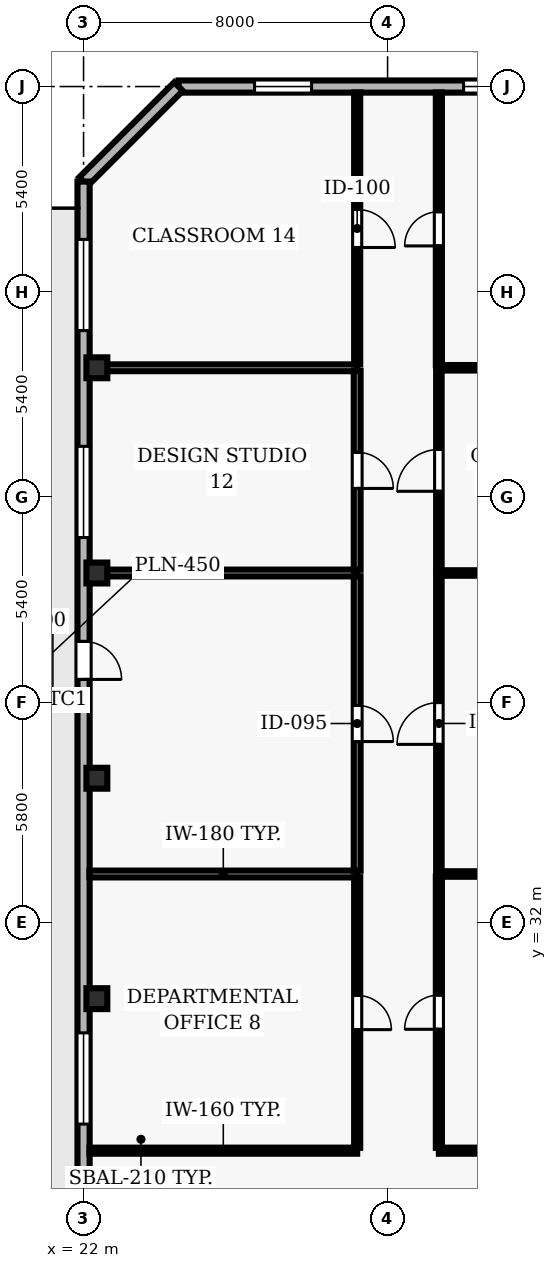
"""IFC4 building model, lengths in metres.
Left out: names, types, materials, properties, quantities, classifications, styles, units other than length and angle.
Written with IfcOpenShell. Run it as: python <this file> out.ifc"""

import sys

from ifc_helpers import new_model, si_unit, direction, frame, frame_2d, origin, origin_2d, place, context, subcontext, project, spatial, rectangle, hollow_rectangle, extrude, element, fill, save


model = new_model("IFC4")
c1 = context("Model", 3, precision=1e-05, world=origin(), true_north=direction((0.0, 1.0)))
c2 = subcontext(c1, "Body", "Model", "MODEL_VIEW")
j1 = project(units=[si_unit("LENGTHUNIT", "METRE"), si_unit("PLANEANGLEUNIT", "RADIAN")], contexts=[c1])
p1 = place(None, origin())
s1 = spatial("IfcSite", under=j1, at=p1, CompositionType="ELEMENT")
p2 = place(p1, origin())
s2 = spatial("IfcBuilding", under=s1, at=p2, CompositionType="ELEMENT")
p3 = place(p2, frame((0.0, 0.0, 81.7)))
s3 = spatial("IfcBuildingStorey", under=s2, at=p3, CompositionType="ELEMENT", Elevation=81.7)
for number, where, z_axis, x_axis in (
    (1, (22.35, 30.0, 0.0), (0.0, 0.0, 1.0), (1.0, 0.0, 0.0)),
    (2, (22.35, 35.8, 0.0), (0.0, 0.0, 1.0), (1.0, 0.0, 0.0)),
    (3, (22.35, 41.2, 0.0), (0.0, 0.0, 1.0), (1.0, 0.0, 0.0)),
    (4, (22.35, 46.6, 0.0), (0.0, 0.0, 1.0), (1.0, 0.0, 0.0)),
):
    element("IfcColumn", number, at=place(p3, frame(where, z_axis=z_axis, x_axis=x_axis)), inside=s3, PredefinedType="COLUMN", context=c2, shape_type="SweptSolid", body=[
        extrude(hollow_rectangle(XDim=0.55, YDim=0.55, WallThickness=0.025, at=origin_2d()), origin(), (0.0, 0.0, 1.0), 3.9),
    ])
p4 = place(p3, frame((35.5, 54.0, 0.0), z_axis=(0.0, 0.0, 1.0), x_axis=(-1.0, 0.0, 0.0)))
e5 = element("IfcWall", 5, at=p4, inside=s3, PredefinedType="SOLIDWALL", context=c2, shape_type="SweptSolid", body=[
    extrude(rectangle(XDim=11.0, YDim=0.32, at=frame_2d((5.5, 0.0))), origin(), (0.0, 0.0, 1.0), 3.69),
])
p5 = place(p4, frame((2.0, 0.0, 0.9)))
e6 = element("IfcOpeningElement", 6, at=p5, cuts=e5, PredefinedType="OPENING", context=c2, shape_type="SweptSolid", body=[
    extrude(rectangle(XDim=1.5, YDim=1.8, at=frame_2d((0.75, 0.9))), frame((0.0, 0.17, 0.0), z_axis=(0.0, -1.0, 0.0), x_axis=(1.0, 0.0, 0.0)), (0.0, 0.0, 1.0), 0.34),
])
p6 = place(p4, frame((7.5, 0.0, 0.9)))
e7 = element("IfcOpeningElement", 7, at=p6, cuts=e5, PredefinedType="OPENING", context=c2, shape_type="SweptSolid", body=[
    extrude(rectangle(XDim=1.5, YDim=1.8, at=frame_2d((0.75, 0.9))), frame((0.0, 0.17, 0.0), z_axis=(0.0, -1.0, 0.0), x_axis=(1.0, 0.0, 0.0)), (0.0, 0.0, 1.0), 0.34),
])
p7 = place(p3, frame((24.5, 54.0, 0.0), z_axis=(0.0, 0.0, 1.0), x_axis=(-0.707106781187, -0.707106781187, 0.0)))
e8 = element("IfcWall", 8, at=p7, inside=s3, PredefinedType="SOLIDWALL", context=c2, shape_type="SweptSolid", body=[
    extrude(rectangle(XDim=3.536, YDim=0.32, at=frame_2d((1.768, 0.0))), origin(), (0.0, 0.0, 1.0), 3.69),
])
p8 = place(p3, frame((22.0, 51.5, 0.0), z_axis=(0.0, 0.0, 1.0), x_axis=(0.0, -1.0, 0.0)))
e9 = element("IfcWall", 9, at=p8, inside=s3, PredefinedType="SOLIDWALL", context=c2, shape_type="SweptSolid", body=[
    extrude(rectangle(XDim=49.0, YDim=0.32, at=frame_2d((24.5, 0.0))), origin(), (0.0, 0.0, 1.0), 3.69),
])
p9 = place(p8, frame((12.1, 0.0, 0.0)))
e10 = element("IfcOpeningElement", 10, at=p9, cuts=e9, PredefinedType="OPENING", context=c2, shape_type="SweptSolid", body=[
    extrude(rectangle(XDim=1.0, YDim=2.2, at=frame_2d((0.5, 1.1))), frame((0.0, 0.17, 0.0), z_axis=(0.0, -1.0, 0.0), x_axis=(1.0, 0.0, 0.0)), (0.0, 0.0, 1.0), 0.34),
])
p10 = place(p8, frame((1.522, 0.0, 0.9)))
e11 = element("IfcOpeningElement", 11, at=p10, cuts=e9, PredefinedType="OPENING", context=c2, shape_type="SweptSolid", body=[
    extrude(rectangle(XDim=2.4, YDim=1.8, at=frame_2d((1.2, 0.9))), frame((0.0, 0.17, 0.0), z_axis=(0.0, -1.0, 0.0), x_axis=(1.0, 0.0, 0.0)), (0.0, 0.0, 1.0), 0.34),
])
p11 = place(p8, frame((6.967, 0.0, 0.9)))
e12 = element("IfcOpeningElement", 12, at=p11, cuts=e9, PredefinedType="OPENING", context=c2, shape_type="SweptSolid", body=[
    extrude(rectangle(XDim=2.4, YDim=1.8, at=frame_2d((1.2, 0.9))), frame((0.0, 0.17, 0.0), z_axis=(0.0, -1.0, 0.0), x_axis=(1.0, 0.0, 0.0)), (0.0, 0.0, 1.0), 0.34),
])
p12 = place(p8, frame((22.4, 0.0, 0.9)))
e13 = element("IfcOpeningElement", 13, at=p12, cuts=e9, PredefinedType="OPENING", context=c2, shape_type="SweptSolid", body=[
    extrude(rectangle(XDim=2.4, YDim=1.8, at=frame_2d((1.2, 0.9))), frame((0.0, 0.17, 0.0), z_axis=(0.0, -1.0, 0.0), x_axis=(1.0, 0.0, 0.0)), (0.0, 0.0, 1.0), 0.34),
])
p13 = place(p8, frame((29.194, 0.0, 0.9)))
e14 = element("IfcOpeningElement", 14, at=p13, cuts=e9, PredefinedType="OPENING", context=c2, shape_type="SweptSolid", body=[
    extrude(rectangle(XDim=2.4, YDim=1.8, at=frame_2d((1.2, 0.9))), frame((0.0, 0.17, 0.0), z_axis=(0.0, -1.0, 0.0), x_axis=(1.0, 0.0, 0.0)), (0.0, 0.0, 1.0), 0.34),
])
p14 = place(p8, frame((33.289, 0.0, 0.9)))
e15 = element("IfcOpeningElement", 15, at=p14, cuts=e9, PredefinedType="OPENING", context=c2, shape_type="SweptSolid", body=[
    extrude(rectangle(XDim=2.4, YDim=1.8, at=frame_2d((1.2, 0.9))), frame((0.0, 0.17, 0.0), z_axis=(0.0, -1.0, 0.0), x_axis=(1.0, 0.0, 0.0)), (0.0, 0.0, 1.0), 0.34),
])
p15 = place(p8, frame((39.633, 0.0, 0.9)))
e16 = element("IfcOpeningElement", 16, at=p15, cuts=e9, PredefinedType="OPENING", context=c2, shape_type="SweptSolid", body=[
    extrude(rectangle(XDim=2.4, YDim=1.8, at=frame_2d((1.2, 0.9))), frame((0.0, 0.17, 0.0), z_axis=(0.0, -1.0, 0.0), x_axis=(1.0, 0.0, 0.0)), (0.0, 0.0, 1.0), 0.34),
])
p16 = place(p3, frame((29.2, 26.0, 0.0), z_axis=(0.0, 0.0, 1.0), x_axis=(-1.0, 0.0, 0.0)))
e17 = element("IfcWall", 17, at=p16, inside=s3, PredefinedType="PARTITIONING", context=c2, shape_type="SweptSolid", body=[
    extrude(rectangle(XDim=7.045, YDim=0.16, at=frame_2d((3.522, 0.0))), origin(), (0.0, 0.0, 1.0), 3.69),
])
p17 = place(p3, frame((29.2, 33.28, 0.0), z_axis=(0.0, 0.0, 1.0), x_axis=(-1.0, 0.0, 0.0)))
e18 = element("IfcWall", 18, at=p17, inside=s3, PredefinedType="PARTITIONING", context=c2, shape_type="SweptSolid", body=[
    extrude(rectangle(XDim=7.045, YDim=0.18, at=frame_2d((3.522, 0.0))), origin(), (0.0, 0.0, 1.0), 3.277),
])
for number, where, z_axis, x_axis in (
    (19, (29.2, 41.2, 0.0), (0.0, 0.0, 1.0), (-1.0, 0.0, 0.0)),
    (20, (29.2, 46.6, 0.0), (0.0, 0.0, 1.0), (-1.0, 0.0, 0.0)),
):
    element("IfcWall", number, at=place(p3, frame(where, z_axis=z_axis, x_axis=x_axis)), inside=s3, PredefinedType="PARTITIONING", context=c2, shape_type="SweptSolid", body=[
        extrude(rectangle(XDim=7.045, YDim=0.18, at=frame_2d((3.522, 0.0))), origin(), (0.0, 0.0, 1.0), 3.055),
    ])
p18 = place(p3, frame((35.15, 26.0, 0.0), z_axis=(0.0, 0.0, 1.0), x_axis=(-1.0, 0.0, 0.0)))
e21 = element("IfcWall", 21, at=p18, inside=s3, PredefinedType="PARTITIONING", context=c2, shape_type="SweptSolid", body=[
    extrude(rectangle(XDim=3.8, YDim=0.16, at=frame_2d((1.9, 0.0))), origin(), (0.0, 0.0, 1.0), 3.69),
])
p19 = place(p3, frame((37.845, 33.28, 0.0), z_axis=(0.0, 0.0, 1.0), x_axis=(-1.0, 0.0, 0.0)))
e22 = element("IfcWall", 22, at=p19, inside=s3, PredefinedType="PARTITIONING", context=c2, shape_type="SweptSolid", body=[
    extrude(rectangle(XDim=6.495, YDim=0.145, at=frame_2d((3.248, 0.0))), origin(), (0.0, 0.0, 1.0), 3.277),
])
for number, where, z_axis, x_axis in (
    (23, (37.845, 41.2, 0.0), (0.0, 0.0, 1.0), (-1.0, 0.0, 0.0)),
    (24, (37.845, 46.6, 0.0), (0.0, 0.0, 1.0), (-1.0, 0.0, 0.0)),
):
    element("IfcWall", number, at=place(p3, frame(where, z_axis=z_axis, x_axis=x_axis)), inside=s3, PredefinedType="PARTITIONING", context=c2, shape_type="SweptSolid", body=[
        extrude(rectangle(XDim=6.495, YDim=0.145, at=frame_2d((3.248, 0.0))), origin(), (0.0, 0.0, 1.0), 3.055),
    ])
p20 = place(p3, frame((29.2, 33.195, 0.0), z_axis=(0.0, 0.0, 1.0), x_axis=(0.0, -1.0, 0.0)))
e25 = element("IfcWall", 25, at=p20, inside=s3, PredefinedType="PARTITIONING", context=c2, shape_type="SweptSolid", body=[
    extrude(rectangle(XDim=7.12, YDim=0.16, at=frame_2d((3.56, 0.0))), origin(), (0.0, 0.0, 1.0), 3.69),
])
p21 = place(p20, frame((3.11, 0.0, 0.0)))
e26 = element("IfcOpeningElement", 26, at=p21, cuts=e25, PredefinedType="OPENING", context=c2, shape_type="SweptSolid", body=[
    extrude(rectangle(XDim=0.9, YDim=2.1, at=frame_2d((0.45, 1.05))), frame((0.0, 0.09, 0.0), z_axis=(0.0, -1.0, 0.0), x_axis=(1.0, 0.0, 0.0)), (0.0, 0.0, 1.0), 0.18),
])
p22 = place(p3, frame((29.2, 41.115, 0.0), z_axis=(0.0, 0.0, 1.0), x_axis=(0.0, -1.0, 0.0)))
e27 = element("IfcWall", 27, at=p22, inside=s3, PredefinedType="PARTITIONING", context=c2, shape_type="SweptSolid", body=[
    extrude(rectangle(XDim=7.75, YDim=0.18, at=frame_2d((3.875, 0.0))), origin(), (0.0, 0.0, 1.0), 3.69),
])
p23 = place(p22, frame((3.4, 0.0, 0.0)))
e28 = element("IfcOpeningElement", 28, at=p23, cuts=e27, PredefinedType="OPENING", context=c2, shape_type="SweptSolid", body=[
    extrude(rectangle(XDim=0.95, YDim=2.1, at=frame_2d((0.475, 1.05))), frame((0.0, 0.1, 0.0), z_axis=(0.0, -1.0, 0.0), x_axis=(1.0, 0.0, 0.0)), (0.0, 0.0, 1.0), 0.2),
])
p24 = place(p3, frame((29.2, 46.515, 0.0), z_axis=(0.0, 0.0, 1.0), x_axis=(0.0, -1.0, 0.0)))
e29 = element("IfcWall", 29, at=p24, inside=s3, PredefinedType="PARTITIONING", context=c2, shape_type="SweptSolid", body=[
    extrude(rectangle(XDim=5.23, YDim=0.18, at=frame_2d((2.615, 0.0))), origin(), (0.0, 0.0, 1.0), 3.69),
])
p25 = place(p24, frame((2.14, 0.0, 0.0)))
e30 = element("IfcOpeningElement", 30, at=p25, cuts=e29, PredefinedType="OPENING", context=c2, shape_type="SweptSolid", body=[
    extrude(rectangle(XDim=0.95, YDim=2.1, at=frame_2d((0.475, 1.05))), frame((0.0, 0.1, 0.0), z_axis=(0.0, -1.0, 0.0), x_axis=(1.0, 0.0, 0.0)), (0.0, 0.0, 1.0), 0.2),
])
p26 = place(p3, frame((29.2, 53.845, 0.0), z_axis=(0.0, 0.0, 1.0), x_axis=(0.0, -1.0, 0.0)))
e31 = element("IfcWall", 31, at=p26, inside=s3, PredefinedType="PARTITIONING", context=c2, shape_type="SweptSolid", body=[
    extrude(rectangle(XDim=7.16, YDim=0.16, at=frame_2d((3.58, 0.0))), origin(), (0.0, 0.0, 1.0), 3.69),
])
p27 = place(p26, frame((3.08, 0.0, 0.0)))
e32 = element("IfcOpeningElement", 32, at=p27, cuts=e31, PredefinedType="OPENING", context=c2, shape_type="SweptSolid", body=[
    extrude(rectangle(XDim=1.0, YDim=2.1, at=frame_2d((0.5, 1.05))), frame((0.0, 0.09, 0.0), z_axis=(0.0, -1.0, 0.0), x_axis=(1.0, 0.0, 0.0)), (0.0, 0.0, 1.0), 0.18),
])
p28 = place(p3, frame((31.35, 26.075, 0.0), z_axis=(0.0, 0.0, 1.0), x_axis=(0.0, 1.0, 0.0)))
e33 = element("IfcWall", 33, at=p28, inside=s3, PredefinedType="PARTITIONING", context=c2, shape_type="SweptSolid", body=[
    extrude(rectangle(XDim=7.137, YDim=0.16, at=frame_2d((3.568, 0.0))), origin(), (0.0, 0.0, 1.0), 3.69),
])
p29 = place(p28, frame((3.119, 0.0, 0.0)))
e34 = element("IfcOpeningElement", 34, at=p29, cuts=e33, PredefinedType="OPENING", context=c2, shape_type="SweptSolid", body=[
    extrude(rectangle(XDim=0.9, YDim=2.1, at=frame_2d((0.45, 1.05))), frame((0.0, 0.09, 0.0), z_axis=(0.0, -1.0, 0.0), x_axis=(1.0, 0.0, 0.0)), (0.0, 0.0, 1.0), 0.18),
])
p30 = place(p3, frame((31.35, 33.348, 0.0), z_axis=(0.0, 0.0, 1.0), x_axis=(0.0, 1.0, 0.0)))
e35 = element("IfcWall", 35, at=p30, inside=s3, PredefinedType="PARTITIONING", context=c2, shape_type="SweptSolid", body=[
    extrude(rectangle(XDim=7.785, YDim=0.145, at=frame_2d((3.893, 0.0))), origin(), (0.0, 0.0, 1.0), 3.69),
])
p31 = place(p30, frame((3.343, 0.0, 0.0)))
e36 = element("IfcOpeningElement", 36, at=p31, cuts=e35, PredefinedType="OPENING", context=c2, shape_type="SweptSolid", body=[
    extrude(rectangle(XDim=1.1, YDim=2.15, at=frame_2d((0.55, 1.075))), frame((0.0, 0.083, 0.0), z_axis=(0.0, -1.0, 0.0), x_axis=(1.0, 0.0, 0.0)), (0.0, 0.0, 1.0), 0.165),
])
p32 = place(p3, frame((31.35, 41.268, 0.0), z_axis=(0.0, 0.0, 1.0), x_axis=(0.0, 1.0, 0.0)))
e37 = element("IfcWall", 37, at=p32, inside=s3, PredefinedType="PARTITIONING", context=c2, shape_type="SweptSolid", body=[
    extrude(rectangle(XDim=5.264, YDim=0.145, at=frame_2d((2.632, 0.0))), origin(), (0.0, 0.0, 1.0), 3.69),
])
p33 = place(p32, frame((2.082, 0.0, 0.0)))
e38 = element("IfcOpeningElement", 38, at=p33, cuts=e37, PredefinedType="OPENING", context=c2, shape_type="SweptSolid", body=[
    extrude(rectangle(XDim=1.1, YDim=2.15, at=frame_2d((0.55, 1.075))), frame((0.0, 0.083, 0.0), z_axis=(0.0, -1.0, 0.0), x_axis=(1.0, 0.0, 0.0)), (0.0, 0.0, 1.0), 0.165),
])
p34 = place(p3, frame((31.35, 46.668, 0.0), z_axis=(0.0, 0.0, 1.0), x_axis=(0.0, 1.0, 0.0)))
e39 = element("IfcWall", 39, at=p34, inside=s3, PredefinedType="PARTITIONING", context=c2, shape_type="SweptSolid", body=[
    extrude(rectangle(XDim=7.177, YDim=0.16, at=frame_2d((3.588, 0.0))), origin(), (0.0, 0.0, 1.0), 3.69),
])
p35 = place(p34, frame((3.138, 0.0, 0.0)))
e40 = element("IfcOpeningElement", 40, at=p35, cuts=e39, PredefinedType="OPENING", context=c2, shape_type="SweptSolid", body=[
    extrude(rectangle(XDim=0.9, YDim=2.1, at=frame_2d((0.45, 1.05))), frame((0.0, 0.09, 0.0), z_axis=(0.0, -1.0, 0.0), x_axis=(1.0, 0.0, 0.0)), (0.0, 0.0, 1.0), 0.18),
])
p36 = place(p5, origin())
e41 = element("IfcWindow", 41, at=p36, inside=s3, PartitioningType="SINGLE_PANEL", PredefinedType="WINDOW", context=c2, shape_type="SweptSolid", body=[
    extrude(rectangle(XDim=1.5, YDim=1.8, at=frame_2d((0.75, 0.9))), frame((0.0, 0.03, 0.0), z_axis=(0.0, -1.0, 0.0), x_axis=(1.0, 0.0, 0.0)), (0.0, 0.0, 1.0), 0.06),
])
fill(e6, e41)
p37 = place(p6, origin())
e42 = element("IfcWindow", 42, at=p37, inside=s3, PartitioningType="SINGLE_PANEL", PredefinedType="WINDOW", context=c2, shape_type="SweptSolid", body=[
    extrude(rectangle(XDim=1.5, YDim=1.8, at=frame_2d((0.75, 0.9))), frame((0.0, 0.03, 0.0), z_axis=(0.0, -1.0, 0.0), x_axis=(1.0, 0.0, 0.0)), (0.0, 0.0, 1.0), 0.06),
])
fill(e7, e42)
p38 = place(p9, origin())
e43 = element("IfcDoor", 43, at=p38, inside=s3, OperationType="SINGLE_SWING_RIGHT", PredefinedType="DOOR", context=c2, shape_type="SweptSolid", body=[
    extrude(rectangle(XDim=1.0, YDim=2.2, at=frame_2d((0.5, 1.1))), frame((0.0, 0.025, 0.0), z_axis=(0.0, -1.0, 0.0), x_axis=(1.0, 0.0, 0.0)), (0.0, 0.0, 1.0), 0.05),
])
fill(e10, e43)
p39 = place(p10, origin())
e44 = element("IfcWindow", 44, at=p39, inside=s3, PartitioningType="SINGLE_PANEL", PredefinedType="WINDOW", context=c2, shape_type="SweptSolid", body=[
    extrude(rectangle(XDim=2.4, YDim=1.8, at=frame_2d((1.2, 0.9))), frame((0.0, 0.03, 0.0), z_axis=(0.0, -1.0, 0.0), x_axis=(1.0, 0.0, 0.0)), (0.0, 0.0, 1.0), 0.06),
])
fill(e11, e44)
p40 = place(p11, origin())
e45 = element("IfcWindow", 45, at=p40, inside=s3, PartitioningType="SINGLE_PANEL", PredefinedType="WINDOW", context=c2, shape_type="SweptSolid", body=[
    extrude(rectangle(XDim=2.4, YDim=1.8, at=frame_2d((1.2, 0.9))), frame((0.0, 0.03, 0.0), z_axis=(0.0, -1.0, 0.0), x_axis=(1.0, 0.0, 0.0)), (0.0, 0.0, 1.0), 0.06),
])
fill(e12, e45)
p41 = place(p12, origin())
e46 = element("IfcWindow", 46, at=p41, inside=s3, PartitioningType="SINGLE_PANEL", PredefinedType="WINDOW", context=c2, shape_type="SweptSolid", body=[
    extrude(rectangle(XDim=2.4, YDim=1.8, at=frame_2d((1.2, 0.9))), frame((0.0, 0.03, 0.0), z_axis=(0.0, -1.0, 0.0), x_axis=(1.0, 0.0, 0.0)), (0.0, 0.0, 1.0), 0.06),
])
fill(e13, e46)
p42 = place(p21, origin())
e47 = element("IfcDoor", 47, at=p42, inside=s3, OperationType="SINGLE_SWING_RIGHT", PredefinedType="DOOR", context=c2, shape_type="SweptSolid", body=[
    extrude(rectangle(XDim=0.9, YDim=2.1, at=frame_2d((0.45, 1.05))), frame((0.0, 0.025, 0.0), z_axis=(0.0, -1.0, 0.0), x_axis=(1.0, 0.0, 0.0)), (0.0, 0.0, 1.0), 0.05),
])
fill(e26, e47)
p43 = place(p29, origin())
e48 = element("IfcDoor", 48, at=p43, inside=s3, OperationType="SINGLE_SWING_LEFT", PredefinedType="DOOR", context=c2, shape_type="SweptSolid", body=[
    extrude(rectangle(XDim=0.9, YDim=2.1, at=frame_2d((0.45, 1.05))), frame((0.0, 0.025, 0.0), z_axis=(0.0, -1.0, 0.0), x_axis=(1.0, 0.0, 0.0)), (0.0, 0.0, 1.0), 0.05),
])
fill(e34, e48)
p44 = place(p23, origin())
e49 = element("IfcDoor", 49, at=p44, inside=s3, OperationType="SINGLE_SWING_RIGHT", PredefinedType="DOOR", context=c2, shape_type="SweptSolid", body=[
    extrude(rectangle(XDim=0.95, YDim=2.1, at=frame_2d((0.475, 1.05))), frame((0.0, 0.025, 0.0), z_axis=(0.0, -1.0, 0.0), x_axis=(1.0, 0.0, 0.0)), (0.0, 0.0, 1.0), 0.05),
])
fill(e28, e49)
p45 = place(p31, origin())
e50 = element("IfcDoor", 50, at=p45, inside=s3, OperationType="SINGLE_SWING_LEFT", PredefinedType="DOOR", context=c2, shape_type="SweptSolid", body=[
    extrude(rectangle(XDim=1.1, YDim=2.15, at=frame_2d((0.55, 1.075))), frame((0.0, 0.025, 0.0), z_axis=(0.0, -1.0, 0.0), x_axis=(1.0, 0.0, 0.0)), (0.0, 0.0, 1.0), 0.05),
])
fill(e36, e50)
p46 = place(p25, origin())
e51 = element("IfcDoor", 51, at=p46, inside=s3, OperationType="SINGLE_SWING_RIGHT", PredefinedType="DOOR", context=c2, shape_type="SweptSolid", body=[
    extrude(rectangle(XDim=0.95, YDim=2.1, at=frame_2d((0.475, 1.05))), frame((0.0, 0.025, 0.0), z_axis=(0.0, -1.0, 0.0), x_axis=(1.0, 0.0, 0.0)), (0.0, 0.0, 1.0), 0.05),
])
fill(e30, e51)
p47 = place(p33, origin())
e52 = element("IfcDoor", 52, at=p47, inside=s3, OperationType="SINGLE_SWING_LEFT", PredefinedType="DOOR", context=c2, shape_type="SweptSolid", body=[
    extrude(rectangle(XDim=1.1, YDim=2.15, at=frame_2d((0.55, 1.075))), frame((0.0, 0.025, 0.0), z_axis=(0.0, -1.0, 0.0), x_axis=(1.0, 0.0, 0.0)), (0.0, 0.0, 1.0), 0.05),
])
fill(e38, e52)
p48 = place(p27, origin())
e53 = element("IfcDoor", 53, at=p48, inside=s3, OperationType="SINGLE_SWING_RIGHT", PredefinedType="DOOR", context=c2, shape_type="SweptSolid", body=[
    extrude(rectangle(XDim=1.0, YDim=2.1, at=frame_2d((0.5, 1.05))), frame((0.0, 0.025, 0.0), z_axis=(0.0, -1.0, 0.0), x_axis=(1.0, 0.0, 0.0)), (0.0, 0.0, 1.0), 0.05),
])
fill(e32, e53)
p49 = place(p35, origin())
e54 = element("IfcDoor", 54, at=p49, inside=s3, OperationType="SINGLE_SWING_LEFT", PredefinedType="DOOR", context=c2, shape_type="SweptSolid", body=[
    extrude(rectangle(XDim=0.9, YDim=2.1, at=frame_2d((0.45, 1.05))), frame((0.0, 0.025, 0.0), z_axis=(0.0, -1.0, 0.0), x_axis=(1.0, 0.0, 0.0)), (0.0, 0.0, 1.0), 0.05),
])
fill(e40, e54)
save(model, sys.argv[1])
